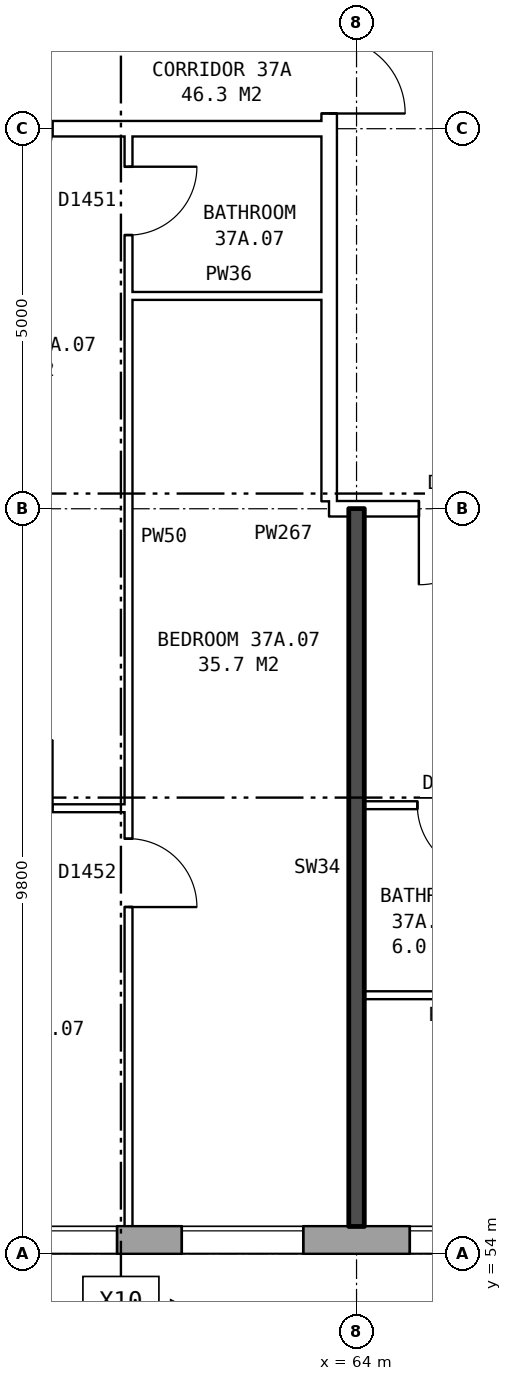
"""IFC4 building model, lengths in metres.
Left out: names, types, materials, properties, quantities, classifications, styles, units other than length and angle.
Written with IfcOpenShell. Run it as: python <this file> out.ifc"""

import sys

from ifc_helpers import new_model, si_unit, direction, frame, frame_2d, origin, place, context, subcontext, project, spatial, rectangle, extrude, element, fill, save


model = new_model("IFC4")
c1 = context("Model", 3, precision=1e-05, world=origin(), true_north=direction((0.0, 1.0)))
c2 = subcontext(c1, "Body", "Model", "MODEL_VIEW")
j1 = project(units=[si_unit("LENGTHUNIT", "METRE"), si_unit("PLANEANGLEUNIT", "RADIAN")], contexts=[c1])
p1 = place(None, origin())
s1 = spatial("IfcSite", under=j1, at=p1, CompositionType="ELEMENT")
p2 = place(p1, origin())
s2 = spatial("IfcBuilding", under=s1, at=p2, CompositionType="ELEMENT")
p3 = place(p2, frame((0.0, 0.0, 133.0)))
s3 = spatial("IfcBuildingStorey", under=s2, at=p3, CompositionType="ELEMENT", Elevation=133.0)
p4 = place(p3, frame((29.825, 54.18, 0.0), z_axis=(0.0, 0.0, 1.0), x_axis=(1.0, 0.0, 0.0)))
e1 = element("IfcWall", 1, at=p4, inside=s3, PredefinedType="STANDARD", context=c2, shape_type="SweptSolid", body=[
    extrude(rectangle(XDim=43.101, YDim=0.36, at=frame_2d((21.55, 0.0))), origin(), (0.0, 0.0, 1.0), 2.85),
])
p5 = place(p4, frame((1.875, 0.0, 0.8)))
e2 = element("IfcOpeningElement", 2, at=p5, cuts=e1, PredefinedType="OPENING", context=c2, shape_type="SweptSolid", body=[
    extrude(rectangle(XDim=1.6, YDim=1.8, at=frame_2d((0.8, 0.9))), frame((0.0, 0.19, 0.0), z_axis=(0.0, -1.0, 0.0), x_axis=(1.0, 0.0, 0.0)), (0.0, 0.0, 1.0), 0.38),
])
p6 = place(p4, frame((4.875, 0.0, 0.8)))
e3 = element("IfcOpeningElement", 3, at=p6, cuts=e1, PredefinedType="OPENING", context=c2, shape_type="SweptSolid", body=[
    extrude(rectangle(XDim=1.6, YDim=1.8, at=frame_2d((0.8, 0.9))), frame((0.0, 0.19, 0.0), z_axis=(0.0, -1.0, 0.0), x_axis=(1.0, 0.0, 0.0)), (0.0, 0.0, 1.0), 0.38),
])
p7 = place(p4, frame((7.875, 0.0, 0.8)))
e4 = element("IfcOpeningElement", 4, at=p7, cuts=e1, PredefinedType="OPENING", context=c2, shape_type="SweptSolid", body=[
    extrude(rectangle(XDim=1.6, YDim=1.8, at=frame_2d((0.8, 0.9))), frame((0.0, 0.19, 0.0), z_axis=(0.0, -1.0, 0.0), x_axis=(1.0, 0.0, 0.0)), (0.0, 0.0, 1.0), 0.38),
])
p8 = place(p4, frame((10.875, 0.0, 0.8)))
e5 = element("IfcOpeningElement", 5, at=p8, cuts=e1, PredefinedType="OPENING", context=c2, shape_type="SweptSolid", body=[
    extrude(rectangle(XDim=1.6, YDim=1.8, at=frame_2d((0.8, 0.9))), frame((0.0, 0.19, 0.0), z_axis=(0.0, -1.0, 0.0), x_axis=(1.0, 0.0, 0.0)), (0.0, 0.0, 1.0), 0.38),
])
p9 = place(p4, frame((14.275, 0.0, 0.8)))
e6 = element("IfcOpeningElement", 6, at=p9, cuts=e1, PredefinedType="OPENING", context=c2, shape_type="SweptSolid", body=[
    extrude(rectangle(XDim=0.8, YDim=0.9, at=frame_2d((0.4, 0.45))), frame((0.0, 0.19, 0.0), z_axis=(0.0, -1.0, 0.0), x_axis=(1.0, 0.0, 0.0)), (0.0, 0.0, 1.0), 0.38),
])
p10 = place(p4, frame((16.875, 0.0, 0.8)))
e7 = element("IfcOpeningElement", 7, at=p10, cuts=e1, PredefinedType="OPENING", context=c2, shape_type="SweptSolid", body=[
    extrude(rectangle(XDim=1.6, YDim=1.8, at=frame_2d((0.8, 0.9))), frame((0.0, 0.19, 0.0), z_axis=(0.0, -1.0, 0.0), x_axis=(1.0, 0.0, 0.0)), (0.0, 0.0, 1.0), 0.38),
])
p11 = place(p4, frame((19.875, 0.0, 0.8)))
e8 = element("IfcOpeningElement", 8, at=p11, cuts=e1, PredefinedType="OPENING", context=c2, shape_type="SweptSolid", body=[
    extrude(rectangle(XDim=1.6, YDim=1.8, at=frame_2d((0.8, 0.9))), frame((0.0, 0.19, 0.0), z_axis=(0.0, -1.0, 0.0), x_axis=(1.0, 0.0, 0.0)), (0.0, 0.0, 1.0), 0.38),
])
p12 = place(p4, frame((22.875, 0.0, 0.8)))
e9 = element("IfcOpeningElement", 9, at=p12, cuts=e1, PredefinedType="OPENING", context=c2, shape_type="SweptSolid", body=[
    extrude(rectangle(XDim=1.6, YDim=1.8, at=frame_2d((0.8, 0.9))), frame((0.0, 0.19, 0.0), z_axis=(0.0, -1.0, 0.0), x_axis=(1.0, 0.0, 0.0)), (0.0, 0.0, 1.0), 0.38),
])
p13 = place(p4, frame((25.875, 0.0, 0.8)))
e10 = element("IfcOpeningElement", 10, at=p13, cuts=e1, PredefinedType="OPENING", context=c2, shape_type="SweptSolid", body=[
    extrude(rectangle(XDim=1.6, YDim=1.8, at=frame_2d((0.8, 0.9))), frame((0.0, 0.19, 0.0), z_axis=(0.0, -1.0, 0.0), x_axis=(1.0, 0.0, 0.0)), (0.0, 0.0, 1.0), 0.38),
])
p14 = place(p4, frame((28.375, 0.0, 0.25)))
e11 = element("IfcOpeningElement", 11, at=p14, cuts=e1, PredefinedType="OPENING", context=c2, shape_type="SweptSolid", body=[
    extrude(rectangle(XDim=1.0, YDim=0.9, at=frame_2d((0.5, 0.45))), frame((0.0, 0.19, 0.0), z_axis=(0.0, -1.0, 0.0), x_axis=(1.0, 0.0, 0.0)), (0.0, 0.0, 1.0), 0.38),
])
p15 = place(p4, frame((31.875, 0.0, 0.8)))
e12 = element("IfcOpeningElement", 12, at=p15, cuts=e1, PredefinedType="OPENING", context=c2, shape_type="SweptSolid", body=[
    extrude(rectangle(XDim=1.6, YDim=1.8, at=frame_2d((0.8, 0.9))), frame((0.0, 0.19, 0.0), z_axis=(0.0, -1.0, 0.0), x_axis=(1.0, 0.0, 0.0)), (0.0, 0.0, 1.0), 0.38),
])
p16 = place(p4, frame((34.875, 0.0, 0.8)))
e13 = element("IfcOpeningElement", 13, at=p16, cuts=e1, PredefinedType="OPENING", context=c2, shape_type="SweptSolid", body=[
    extrude(rectangle(XDim=1.6, YDim=1.8, at=frame_2d((0.8, 0.9))), frame((0.0, 0.19, 0.0), z_axis=(0.0, -1.0, 0.0), x_axis=(1.0, 0.0, 0.0)), (0.0, 0.0, 1.0), 0.38),
])
p17 = place(p4, frame((37.875, 0.0, 0.8)))
e14 = element("IfcOpeningElement", 14, at=p17, cuts=e1, PredefinedType="OPENING", context=c2, shape_type="SweptSolid", body=[
    extrude(rectangle(XDim=1.6, YDim=1.8, at=frame_2d((0.8, 0.9))), frame((0.0, 0.19, 0.0), z_axis=(0.0, -1.0, 0.0), x_axis=(1.0, 0.0, 0.0)), (0.0, 0.0, 1.0), 0.38),
])
p18 = place(p4, frame((40.875, 0.0, 0.8)))
e15 = element("IfcOpeningElement", 15, at=p18, cuts=e1, PredefinedType="OPENING", context=c2, shape_type="SweptSolid", body=[
    extrude(rectangle(XDim=1.6, YDim=1.8, at=frame_2d((0.8, 0.9))), frame((0.0, 0.19, 0.0), z_axis=(0.0, -1.0, 0.0), x_axis=(1.0, 0.0, 0.0)), (0.0, 0.0, 1.0), 0.38),
])
p19 = place(p4, frame((15.375, 0.0, 0.8)))
e16 = element("IfcOpeningElement", 16, at=p19, cuts=e1, PredefinedType="OPENING", context=c2, shape_type="SweptSolid", body=[
    extrude(rectangle(XDim=0.6, YDim=1.8, at=frame_2d((0.3, 0.9))), frame((0.0, 0.19, 0.0), z_axis=(0.0, -1.0, 0.0), x_axis=(1.0, 0.0, 0.0)), (0.0, 0.0, 1.0), 0.38),
])
p20 = place(p4, frame((30.025, 0.0, 1.65)))
e17 = element("IfcOpeningElement", 17, at=p20, cuts=e1, PredefinedType="OPENING", context=c2, shape_type="SweptSolid", body=[
    extrude(rectangle(XDim=1.0, YDim=0.9, at=frame_2d((0.5, 0.45))), frame((0.0, 0.19, 0.0), z_axis=(0.0, -1.0, 0.0), x_axis=(1.0, 0.0, 0.0)), (0.0, 0.0, 1.0), 0.38),
])
p21 = place(p3, frame((63.64, 63.9, 0.0), z_axis=(0.0, 0.0, 1.0), x_axis=(0.0, 1.0, 0.0)))
e18 = element("IfcWall", 18, at=p21, inside=s3, PredefinedType="PARTITIONING", context=c2, shape_type="SweptSolid", body=[
    extrude(rectangle(XDim=12.2, YDim=0.2, at=frame_2d((6.1, 0.0))), origin(), (0.0, 0.0, 1.0), 2.85),
])
p22 = place(p21, frame((5.1, 0.0, 0.0)))
e19 = element("IfcOpeningElement", 19, at=p22, cuts=e18, PredefinedType="OPENING", context=c2, shape_type="SweptSolid", body=[
    extrude(rectangle(XDim=2.0, YDim=2.1, at=frame_2d((1.0, 1.05))), frame((0.0, 0.11, 0.0), z_axis=(0.0, -1.0, 0.0), x_axis=(1.0, 0.0, 0.0)), (0.0, 0.0, 1.0), 0.22),
])
p23 = place(p3, frame((64.1, 57.4, 0.0), z_axis=(0.0, 0.0, 1.0), x_axis=(1.0, 0.0, 0.0)))
e20 = element("IfcWall", 20, at=p23, inside=s3, PredefinedType="PARTITIONING", context=c2, shape_type="SweptSolid", body=[
    extrude(rectangle(XDim=2.3, YDim=0.1, at=frame_2d((1.15, 0.0))), origin(), (0.0, 0.0, 1.0), 2.85),
])
p24 = place(p3, frame((58.1, 59.86, 0.0), z_axis=(0.0, 0.0, 1.0), x_axis=(1.0, 0.0, 0.0)))
e21 = element("IfcWall", 21, at=p24, inside=s3, PredefinedType="PARTITIONING", context=c2, shape_type="SweptSolid", body=[
    extrude(rectangle(XDim=2.9, YDim=0.1, at=frame_2d((1.45, 0.0))), origin(), (0.0, 0.0, 1.0), 2.85),
])
p25 = place(p24, frame((1.0, 0.0, 0.0)))
e22 = element("IfcOpeningElement", 22, at=p25, cuts=e21, PredefinedType="OPENING", context=c2, shape_type="SweptSolid", body=[
    extrude(rectangle(XDim=0.9, YDim=2.1, at=frame_2d((0.45, 1.05))), frame((0.0, 0.06, 0.0), z_axis=(0.0, -1.0, 0.0), x_axis=(1.0, 0.0, 0.0)), (0.0, 0.0, 1.0), 0.12),
])
p26 = place(p3, frame((64.1, 59.9, 0.0), z_axis=(0.0, 0.0, 1.0), x_axis=(1.0, 0.0, 0.0)))
e23 = element("IfcWall", 23, at=p26, inside=s3, PredefinedType="PARTITIONING", context=c2, shape_type="SweptSolid", body=[
    extrude(rectangle(XDim=5.8, YDim=0.1, at=frame_2d((2.9, 0.0))), origin(), (0.0, 0.0, 1.0), 2.85),
])
p27 = place(p26, frame((3.6, 0.0, 0.0)))
e24 = element("IfcOpeningElement", 24, at=p27, cuts=e23, PredefinedType="OPENING", context=c2, shape_type="SweptSolid", body=[
    extrude(rectangle(XDim=0.9, YDim=2.1, at=frame_2d((0.45, 1.05))), frame((0.0, 0.06, 0.0), z_axis=(0.0, -1.0, 0.0), x_axis=(1.0, 0.0, 0.0)), (0.0, 0.0, 1.0), 0.12),
])
p28 = place(p26, frame((0.7, 0.0, 0.0)))
e25 = element("IfcOpeningElement", 25, at=p28, cuts=e23, PredefinedType="OPENING", context=c2, shape_type="SweptSolid", body=[
    extrude(rectangle(XDim=0.9, YDim=2.1, at=frame_2d((0.45, 1.05))), frame((0.0, 0.06, 0.0), z_axis=(0.0, -1.0, 0.0), x_axis=(1.0, 0.0, 0.0)), (0.0, 0.0, 1.0), 0.12),
])
p29 = place(p3, frame((63.64, 63.8, 0.0), z_axis=(0.0, 0.0, 1.0), x_axis=(1.0, 0.0, 0.0)))
e26 = element("IfcWall", 26, at=p29, inside=s3, PredefinedType="PARTITIONING", context=c2, shape_type="SweptSolid", body=[
    extrude(rectangle(XDim=3.0, YDim=0.2, at=frame_2d((1.5, 0.0))), origin(), (0.0, 0.0, 1.0), 2.85),
])
p30 = place(p29, frame((1.18, 0.0, 0.0)))
e27 = element("IfcOpeningElement", 27, at=p30, cuts=e26, PredefinedType="OPENING", context=c2, shape_type="SweptSolid", body=[
    extrude(rectangle(XDim=1.0, YDim=2.1, at=frame_2d((0.5, 1.05))), frame((0.0, 0.11, 0.0), z_axis=(0.0, -1.0, 0.0), x_axis=(1.0, 0.0, 0.0)), (0.0, 0.0, 1.0), 0.22),
])
p31 = place(p3, frame((61.0, 66.6, 0.0), z_axis=(0.0, 0.0, 1.0), x_axis=(1.0, 0.0, 0.0)))
e28 = element("IfcWall", 28, at=p31, inside=s3, PredefinedType="PARTITIONING", context=c2, shape_type="SweptSolid", body=[
    extrude(rectangle(XDim=2.64, YDim=0.1, at=frame_2d((1.32, 0.0))), origin(), (0.0, 0.0, 1.0), 2.85),
])
p32 = place(p3, frame((44.36, 68.8, 0.0), z_axis=(0.0, 0.0, 1.0), x_axis=(1.0, 0.0, 0.0)))
e29 = element("IfcWall", 29, at=p32, inside=s3, PredefinedType="PARTITIONING", context=c2, shape_type="SweptSolid", body=[
    extrude(rectangle(XDim=19.28, YDim=0.2, at=frame_2d((9.64, 0.0))), origin(), (0.0, 0.0, 1.0), 2.85),
])
p33 = place(p32, frame((14.64, 0.0, 0.0)))
e30 = element("IfcOpeningElement", 30, at=p33, cuts=e29, PredefinedType="OPENING", context=c2, shape_type="SweptSolid", body=[
    extrude(rectangle(XDim=1.0, YDim=2.1, at=frame_2d((0.5, 1.05))), frame((0.0, 0.11, 0.0), z_axis=(0.0, -1.0, 0.0), x_axis=(1.0, 0.0, 0.0)), (0.0, 0.0, 1.0), 0.22),
])
p34 = place(p32, frame((8.64, 0.0, 0.0)))
e31 = element("IfcOpeningElement", 31, at=p34, cuts=e29, PredefinedType="OPENING", context=c2, shape_type="SweptSolid", body=[
    extrude(rectangle(XDim=1.0, YDim=2.1, at=frame_2d((0.5, 1.05))), frame((0.0, 0.11, 0.0), z_axis=(0.0, -1.0, 0.0), x_axis=(1.0, 0.0, 0.0)), (0.0, 0.0, 1.0), 0.22),
])
p35 = place(p32, frame((2.64, 0.0, 0.0)))
e32 = element("IfcOpeningElement", 32, at=p35, cuts=e29, PredefinedType="OPENING", context=c2, shape_type="SweptSolid", body=[
    extrude(rectangle(XDim=1.0, YDim=2.1, at=frame_2d((0.5, 1.05))), frame((0.0, 0.11, 0.0), z_axis=(0.0, -1.0, 0.0), x_axis=(1.0, 0.0, 0.0)), (0.0, 0.0, 1.0), 0.22),
])
p36 = place(p3, frame((61.0, 54.36, 0.0), z_axis=(0.0, 0.0, 1.0), x_axis=(0.0, 1.0, 0.0)))
e33 = element("IfcWall", 33, at=p36, inside=s3, PredefinedType="PARTITIONING", context=c2, shape_type="SweptSolid", body=[
    extrude(rectangle(XDim=14.34, YDim=0.1, at=frame_2d((7.17, 0.0))), origin(), (0.0, 0.0, 1.0), 2.85),
])
p37 = place(p36, frame((4.2, 0.0, 0.0)))
e34 = element("IfcOpeningElement", 34, at=p37, cuts=e33, PredefinedType="OPENING", context=c2, shape_type="SweptSolid", body=[
    extrude(rectangle(XDim=0.9, YDim=2.1, at=frame_2d((0.45, 1.05))), frame((0.0, 0.06, 0.0), z_axis=(0.0, -1.0, 0.0), x_axis=(1.0, 0.0, 0.0)), (0.0, 0.0, 1.0), 0.12),
])
p38 = place(p36, frame((13.04, 0.0, 0.0)))
e35 = element("IfcOpeningElement", 35, at=p38, cuts=e33, PredefinedType="OPENING", context=c2, shape_type="SweptSolid", body=[
    extrude(rectangle(XDim=0.9, YDim=2.1, at=frame_2d((0.45, 1.05))), frame((0.0, 0.06, 0.0), z_axis=(0.0, -1.0, 0.0), x_axis=(1.0, 0.0, 0.0)), (0.0, 0.0, 1.0), 0.12),
])
p39 = place(p3, frame((64.0, 54.36, 0.0), z_axis=(0.0, 0.0, 1.0), x_axis=(0.0, 1.0, 0.0)))
e36 = element("IfcWall", 36, at=p39, inside=s3, PredefinedType="SOLIDWALL", context=c2, shape_type="SweptSolid", body=[
    extrude(rectangle(XDim=9.44, YDim=0.2, at=frame_2d((4.72, 0.0))), origin(), (0.0, 0.0, 1.0), 2.85),
])
p40 = place(p15, origin())
e37 = element("IfcWindow", 37, at=p40, inside=s3, PartitioningType="SINGLE_PANEL", PredefinedType="WINDOW", context=c2, shape_type="SweptSolid", body=[
    extrude(rectangle(XDim=1.6, YDim=1.8, at=frame_2d((0.8, 0.9))), frame((0.0, 0.15, 0.0), z_axis=(0.0, -1.0, 0.0), x_axis=(1.0, 0.0, 0.0)), (0.0, 0.0, 1.0), 0.06),
])
fill(e12, e37)
p41 = place(p16, origin())
e38 = element("IfcWindow", 38, at=p41, inside=s3, PartitioningType="SINGLE_PANEL", PredefinedType="WINDOW", context=c2, shape_type="SweptSolid", body=[
    extrude(rectangle(XDim=1.6, YDim=1.8, at=frame_2d((0.8, 0.9))), frame((0.0, 0.15, 0.0), z_axis=(0.0, -1.0, 0.0), x_axis=(1.0, 0.0, 0.0)), (0.0, 0.0, 1.0), 0.06),
])
fill(e13, e38)
p42 = place(p22, frame((2.0, 0.0, 0.0), z_axis=(0.0, 0.0, 1.0), x_axis=(-1.0, 0.0, 0.0)))
e39 = element("IfcDoor", 39, at=p42, inside=s3, OperationType="DOUBLE_DOOR_SINGLE_SWING", PredefinedType="DOOR", context=c2, shape_type="SweptSolid", body=[
    extrude(rectangle(XDim=2.0, YDim=2.1, at=frame_2d((1.0, 1.05))), frame((0.0, 0.025, 0.0), z_axis=(0.0, -1.0, 0.0), x_axis=(1.0, 0.0, 0.0)), (0.0, 0.0, 1.0), 0.05),
])
fill(e19, e39)
p43 = place(p30, frame((1.0, 0.0, 0.0), z_axis=(0.0, 0.0, 1.0), x_axis=(-1.0, 0.0, 0.0)))
e40 = element("IfcDoor", 40, at=p43, inside=s3, OperationType="SINGLE_SWING_RIGHT", PredefinedType="DOOR", context=c2, shape_type="SweptSolid", body=[
    extrude(rectangle(XDim=1.0, YDim=2.1, at=frame_2d((0.5, 1.05))), frame((0.0, 0.025, 0.0), z_axis=(0.0, -1.0, 0.0), x_axis=(1.0, 0.0, 0.0)), (0.0, 0.0, 1.0), 0.05),
])
fill(e27, e40)
p44 = place(p28, frame((0.9, 0.0, 0.0), z_axis=(0.0, 0.0, 1.0), x_axis=(-1.0, 0.0, 0.0)))
e41 = element("IfcDoor", 41, at=p44, inside=s3, OperationType="SINGLE_SWING_LEFT", PredefinedType="DOOR", context=c2, shape_type="SweptSolid", body=[
    extrude(rectangle(XDim=0.9, YDim=2.1, at=frame_2d((0.45, 1.05))), frame((0.0, 0.025, 0.0), z_axis=(0.0, -1.0, 0.0), x_axis=(1.0, 0.0, 0.0)), (0.0, 0.0, 1.0), 0.05),
])
fill(e25, e41)
p45 = place(p37, frame((0.9, 0.0, 0.0), z_axis=(0.0, 0.0, 1.0), x_axis=(-1.0, 0.0, 0.0)))
e42 = element("IfcDoor", 42, at=p45, inside=s3, OperationType="SINGLE_SWING_RIGHT", PredefinedType="DOOR", context=c2, shape_type="SweptSolid", body=[
    extrude(rectangle(XDim=0.9, YDim=2.1, at=frame_2d((0.45, 1.05))), frame((0.0, 0.025, 0.0), z_axis=(0.0, -1.0, 0.0), x_axis=(1.0, 0.0, 0.0)), (0.0, 0.0, 1.0), 0.05),
])
fill(e34, e42)
p46 = place(p38, frame((0.9, 0.0, 0.0), z_axis=(0.0, 0.0, 1.0), x_axis=(-1.0, 0.0, 0.0)))
e43 = element("IfcDoor", 43, at=p46, inside=s3, OperationType="SINGLE_SWING_LEFT", PredefinedType="DOOR", context=c2, shape_type="SweptSolid", body=[
    extrude(rectangle(XDim=0.9, YDim=2.1, at=frame_2d((0.45, 1.05))), frame((0.0, 0.025, 0.0), z_axis=(0.0, -1.0, 0.0), x_axis=(1.0, 0.0, 0.0)), (0.0, 0.0, 1.0), 0.05),
])
fill(e35, e43)
p47 = place(p20, origin())
e44 = element("IfcWindow", 44, at=p47, inside=s3, PartitioningType="SINGLE_PANEL", PredefinedType="WINDOW", context=c2, shape_type="SweptSolid", body=[
    extrude(rectangle(XDim=1.0, YDim=0.9, at=frame_2d((0.5, 0.45))), frame((0.0, 0.15, 0.0), z_axis=(0.0, -1.0, 0.0), x_axis=(1.0, 0.0, 0.0)), (0.0, 0.0, 1.0), 0.06),
])
fill(e17, e44)
save(model, sys.argv[1])
